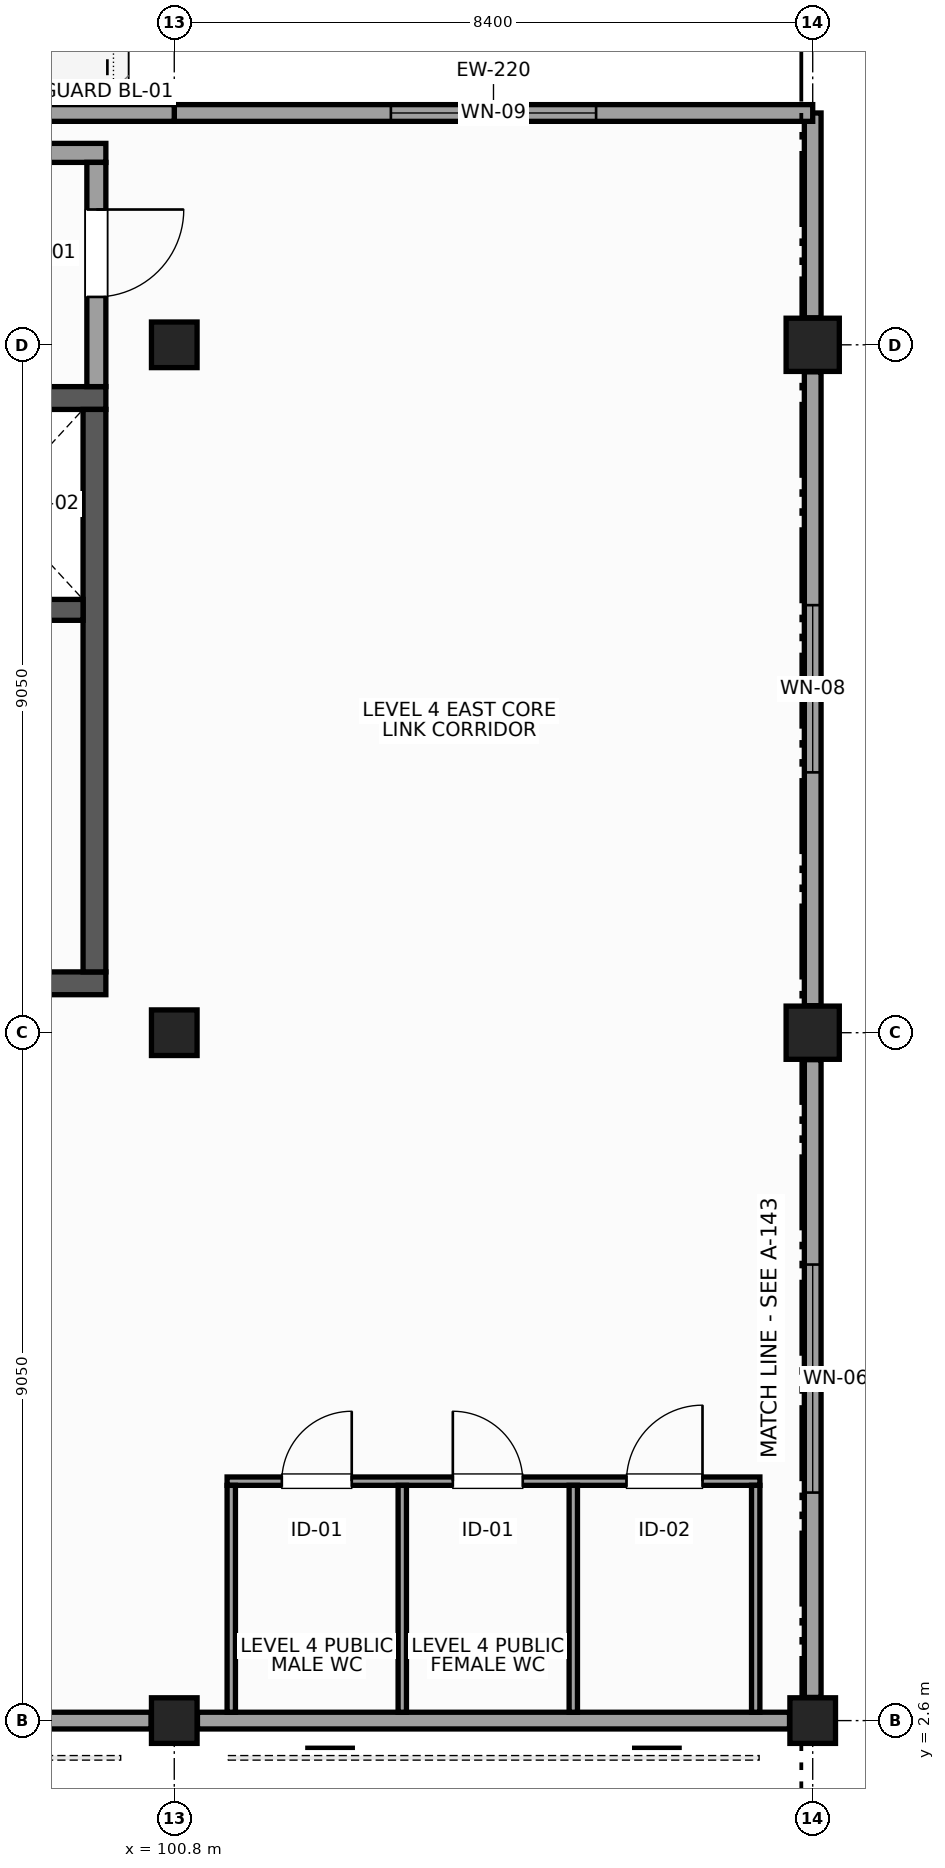
"""IFC4 building model, lengths in metres.
Left out: names, types, materials, properties, quantities, classifications, styles, units other than length and angle.
Written with IfcOpenShell. Run it as: python <this file> out.ifc"""

import sys

from ifc_helpers import new_model, si_unit, direction, frame, frame_2d, origin, origin_2d, place, context, subcontext, project, spatial, rectangle, extrude, element, fill, save


model = new_model("IFC4")
c1 = context("Model", 3, precision=1e-05, world=origin(), true_north=direction((0.0, 1.0)))
c2 = subcontext(c1, "Body", "Model", "MODEL_VIEW")
j1 = project(units=[si_unit("LENGTHUNIT", "METRE"), si_unit("PLANEANGLEUNIT", "RADIAN")], contexts=[c1])
p1 = place(None, origin())
s1 = spatial("IfcSite", under=j1, at=p1, CompositionType="ELEMENT")
p2 = place(p1, origin())
s2 = spatial("IfcBuilding", under=s1, at=p2, CompositionType="ELEMENT")
p3 = place(p2, frame((0.0, 0.0, 20.1)))
s3 = spatial("IfcBuildingStorey", under=s2, at=p3, CompositionType="ELEMENT", Elevation=20.1)
for number, where, z_axis, x_axis in (
    (1, (100.8, 2.6, 0.0), (0.0, 0.0, 1.0), (1.0, 0.0, 0.0)),
    (2, (100.8, 11.65, 0.0), (0.0, 0.0, 1.0), (1.0, 0.0, 0.0)),
    (3, (100.8, 20.7, 0.0), (0.0, 0.0, 1.0), (1.0, 0.0, 0.0)),
    (4, (109.2, 2.6, 0.0), (0.0, 0.0, 1.0), (1.0, 0.0, 0.0)),
):
    element("IfcColumn", number, at=place(p3, frame(where, z_axis=z_axis, x_axis=x_axis)), inside=s3, PredefinedType="COLUMN", context=c2, shape_type="SweptSolid", body=[
        extrude(rectangle(XDim=0.6, YDim=0.6, at=origin_2d()), origin(), (0.0, 0.0, 1.0), 4.5),
    ])
p4 = place(p3, frame((109.2, 11.65, 0.0), z_axis=(0.0, 0.0, 1.0), x_axis=(1.0, 0.0, 0.0)))
e5 = element("IfcColumn", 5, at=p4, inside=s3, PredefinedType="COLUMN", context=c2, shape_type="SweptSolid", body=[
    extrude(rectangle(XDim=0.7, YDim=0.7, at=origin_2d()), origin(), (0.0, 0.0, 1.0), 3.75),
])
p5 = place(p3, frame((109.2, 20.7, 0.0), z_axis=(0.0, 0.0, 1.0), x_axis=(1.0, 0.0, 0.0)))
e6 = element("IfcColumn", 6, at=p5, inside=s3, PredefinedType="COLUMN", context=c2, shape_type="SweptSolid", body=[
    extrude(rectangle(XDim=0.7, YDim=0.7, at=origin_2d()), origin(), (0.0, 0.0, 1.0), 4.2),
])
p6 = place(p3, frame((92.705, 2.6, 0.0), z_axis=(0.0, 0.0, 1.0), x_axis=(1.0, 0.0, 0.0)))
e7 = element("IfcWall", 7, at=p6, inside=s3, PredefinedType="STANDARD", context=c2, shape_type="SweptSolid", body=[
    extrude(rectangle(XDim=7.79, YDim=0.22, at=frame_2d((3.895, 0.0))), origin(), (0.0, 0.0, 1.0), 4.2),
])
p7 = place(p6, frame((2.595, 0.0, 0.95)))
e8 = element("IfcOpeningElement", 8, at=p7, cuts=e7, PredefinedType="OPENING", context=c2, shape_type="SweptSolid", body=[
    extrude(rectangle(XDim=2.6, YDim=1.6, at=frame_2d((1.3, 0.8))), frame((0.0, 0.12, 0.0), z_axis=(0.0, -1.0, 0.0), x_axis=(1.0, 0.0, 0.0)), (0.0, 0.0, 1.0), 0.24),
])
p8 = place(p3, frame((101.105, 2.6, 0.0), z_axis=(0.0, 0.0, 1.0), x_axis=(1.0, 0.0, 0.0)))
e9 = element("IfcWall", 9, at=p8, inside=s3, PredefinedType="STANDARD", context=c2, shape_type="SweptSolid", body=[
    extrude(rectangle(XDim=7.79, YDim=0.22, at=frame_2d((3.895, 0.0))), origin(), (0.0, 0.0, 1.0), 3.631),
])
p9 = place(p3, frame((109.2, 2.905, 0.0), z_axis=(0.0, 0.0, 1.0), x_axis=(0.0, 1.0, 0.0)))
e10 = element("IfcWall", 10, at=p9, inside=s3, PredefinedType="STANDARD", context=c2, shape_type="SweptSolid", body=[
    extrude(rectangle(XDim=8.39, YDim=0.22, at=frame_2d((4.195, 0.0))), origin(), (0.0, 0.0, 1.0), 3.631),
])
p10 = place(p9, frame((2.695, 0.0, 0.95)))
e11 = element("IfcOpeningElement", 11, at=p10, cuts=e10, PredefinedType="OPENING", context=c2, shape_type="SweptSolid", body=[
    extrude(rectangle(XDim=3.0, YDim=1.8, at=frame_2d((1.5, 0.9))), frame((0.0, 0.12, 0.0), z_axis=(0.0, -1.0, 0.0), x_axis=(1.0, 0.0, 0.0)), (0.0, 0.0, 1.0), 0.24),
])
p11 = place(p3, frame((109.2, 12.005, 0.0), z_axis=(0.0, 0.0, 1.0), x_axis=(0.0, 1.0, 0.0)))
e12 = element("IfcWall", 12, at=p11, inside=s3, PredefinedType="STANDARD", context=c2, shape_type="SweptSolid", body=[
    extrude(rectangle(XDim=8.34, YDim=0.22, at=frame_2d((4.17, 0.0))), origin(), (0.0, 0.0, 1.0), 3.504),
])
p12 = place(p11, frame((3.07, 0.0, 0.95)))
e13 = element("IfcOpeningElement", 13, at=p12, cuts=e12, PredefinedType="OPENING", context=c2, shape_type="SweptSolid", body=[
    extrude(rectangle(XDim=2.2, YDim=1.9, at=frame_2d((1.1, 0.95))), frame((0.0, 0.12, 0.0), z_axis=(0.0, -1.0, 0.0), x_axis=(1.0, 0.0, 0.0)), (0.0, 0.0, 1.0), 0.24),
])
p13 = place(p3, frame((109.2, 21.055, 0.0), z_axis=(0.0, 0.0, 1.0), x_axis=(0.0, 1.0, 0.0)))
e14 = element("IfcWall", 14, at=p13, inside=s3, PredefinedType="STANDARD", context=c2, shape_type="SweptSolid", body=[
    extrude(rectangle(XDim=2.695, YDim=0.22, at=frame_2d((1.348, 0.0))), origin(), (0.0, 0.0, 1.0), 3.504),
])
p14 = place(p3, frame((109.2, 23.75, 0.0), z_axis=(0.0, 0.0, 1.0), x_axis=(-1.0, 0.0, 0.0)))
e15 = element("IfcWall", 15, at=p14, inside=s3, PredefinedType="STANDARD", context=c2, shape_type="SweptSolid", body=[
    extrude(rectangle(XDim=8.4, YDim=0.22, at=frame_2d((4.2, 0.0))), origin(), (0.0, 0.0, 1.0), 3.428),
])
p15 = place(p14, frame((2.85, 0.0, 0.95)))
e16 = element("IfcOpeningElement", 16, at=p15, cuts=e15, PredefinedType="OPENING", context=c2, shape_type="SweptSolid", body=[
    extrude(rectangle(XDim=2.7, YDim=2.0, at=frame_2d((1.35, 1.0))), frame((0.0, 0.12, 0.0), z_axis=(0.0, -1.0, 0.0), x_axis=(1.0, 0.0, 0.0)), (0.0, 0.0, 1.0), 0.24),
])
p16 = place(p3, frame((100.8, 23.75, 0.0), z_axis=(0.0, 0.0, 1.0), x_axis=(-1.0, 0.0, 0.0)))
e17 = element("IfcWall", 17, at=p16, inside=s3, PredefinedType="STANDARD", context=c2, shape_type="SweptSolid", body=[
    extrude(rectangle(XDim=8.4, YDim=0.22, at=frame_2d((4.2, 0.0))), origin(), (0.0, 0.0, 1.0), 3.428),
])
p17 = place(p16, frame((3.2, 0.0, 0.95)))
e18 = element("IfcOpeningElement", 18, at=p17, cuts=e17, PredefinedType="OPENING", context=c2, shape_type="SweptSolid", body=[
    extrude(rectangle(XDim=2.0, YDim=1.5, at=frame_2d((1.0, 0.75))), frame((0.0, 0.12, 0.0), z_axis=(0.0, -1.0, 0.0), x_axis=(1.0, 0.0, 0.0)), (0.0, 0.0, 1.0), 0.24),
])
p18 = place(p3, frame((93.3, 12.3, 0.0), z_axis=(0.0, 0.0, 1.0), x_axis=(1.0, 0.0, 0.0)))
e19 = element("IfcWall", 19, at=p18, inside=s3, PredefinedType="SHEAR", context=c2, shape_type="SweptSolid", body=[
    extrude(rectangle(XDim=6.6, YDim=0.3, at=frame_2d((3.3, 0.0))), origin(), (0.0, 0.0, 1.0), 4.2),
])
p19 = place(p3, frame((93.3, 20.0, 0.0), z_axis=(0.0, 0.0, 1.0), x_axis=(1.0, 0.0, 0.0)))
e20 = element("IfcWall", 20, at=p19, inside=s3, PredefinedType="SHEAR", context=c2, shape_type="SweptSolid", body=[
    extrude(rectangle(XDim=6.6, YDim=0.3, at=frame_2d((3.3, 0.0))), origin(), (0.0, 0.0, 1.0), 4.2),
])
p20 = place(p19, frame((1.425, 0.0, 0.0)))
e21 = element("IfcOpeningElement", 21, at=p20, cuts=e20, PredefinedType="OPENING", context=c2, shape_type="SweptSolid", body=[
    extrude(rectangle(XDim=1.15, YDim=2.2, at=frame_2d((0.575, 1.1))), frame((0.0, 0.16, 0.0), z_axis=(0.0, -1.0, 0.0), x_axis=(1.0, 0.0, 0.0)), (0.0, 0.0, 1.0), 0.32),
])
p21 = place(p19, frame((4.55, 0.0, 0.0)))
e22 = element("IfcOpeningElement", 22, at=p21, cuts=e20, PredefinedType="OPENING", context=c2, shape_type="SweptSolid", body=[
    extrude(rectangle(XDim=1.2, YDim=2.15, at=frame_2d((0.6, 1.075))), frame((0.0, 0.16, 0.0), z_axis=(0.0, -1.0, 0.0), x_axis=(1.0, 0.0, 0.0)), (0.0, 0.0, 1.0), 0.32),
])
p22 = place(p3, frame((99.75, 12.45, 0.0), z_axis=(0.0, 0.0, 1.0), x_axis=(0.0, 1.0, 0.0)))
e23 = element("IfcWall", 23, at=p22, inside=s3, PredefinedType="SHEAR", context=c2, shape_type="SweptSolid", body=[
    extrude(rectangle(XDim=7.4, YDim=0.3, at=frame_2d((3.7, 0.0))), origin(), (0.0, 0.0, 1.0), 4.2),
])
p23 = place(p3, frame((97.3, 17.213, 0.0), z_axis=(0.0, 0.0, 1.0), x_axis=(1.0, 0.0, 0.0)))
e24 = element("IfcWall", 24, at=p23, inside=s3, PredefinedType="SHEAR", context=c2, shape_type="SweptSolid", body=[
    extrude(rectangle(XDim=2.3, YDim=0.275, at=frame_2d((1.15, 0.0))), origin(), (0.0, 0.0, 1.0), 4.2),
])
p24 = place(p3, frame((93.3, 23.225, 0.0), z_axis=(0.0, 0.0, 1.0), x_axis=(1.0, 0.0, 0.0)))
e25 = element("IfcWall", 25, at=p24, inside=s3, PredefinedType="PARTITIONING", context=c2, shape_type="SweptSolid", body=[
    extrude(rectangle(XDim=6.6, YDim=0.25, at=frame_2d((3.3, 0.0))), origin(), (0.0, 0.0, 1.0), 4.2),
])
p25 = place(p3, frame((99.775, 20.15, 0.0), z_axis=(0.0, 0.0, 1.0), x_axis=(0.0, 1.0, 0.0)))
e26 = element("IfcWall", 26, at=p25, inside=s3, PredefinedType="PARTITIONING", context=c2, shape_type="SweptSolid", body=[
    extrude(rectangle(XDim=2.95, YDim=0.25, at=frame_2d((1.475, 0.0))), origin(), (0.0, 0.0, 1.0), 3.783),
])
p26 = place(p25, frame((1.18, 0.0, 0.0)))
e27 = element("IfcOpeningElement", 27, at=p26, cuts=e26, PredefinedType="OPENING", context=c2, shape_type="SweptSolid", body=[
    extrude(rectangle(XDim=1.15, YDim=2.2, at=frame_2d((0.575, 1.1))), frame((0.0, 0.135, 0.0), z_axis=(0.0, -1.0, 0.0), x_axis=(1.0, 0.0, 0.0)), (0.0, 0.0, 1.0), 0.27),
])
p27 = place(p3, frame((101.495, 5.75, 0.0), z_axis=(0.0, 0.0, 1.0), x_axis=(1.0, 0.0, 0.0)))
e28 = element("IfcWall", 28, at=p27, inside=s3, PredefinedType="PARTITIONING", context=c2, shape_type="SweptSolid", body=[
    extrude(rectangle(XDim=7.01, YDim=0.11, at=frame_2d((3.505, 0.0))), origin(), (0.0, 0.0, 1.0), 3.631),
])
p28 = place(p27, frame((0.72, 0.0, 0.0)))
e29 = element("IfcOpeningElement", 29, at=p28, cuts=e28, PredefinedType="OPENING", context=c2, shape_type="SweptSolid", body=[
    extrude(rectangle(XDim=0.92, YDim=2.1, at=frame_2d((0.46, 1.05))), frame((0.0, 0.065, 0.0), z_axis=(0.0, -1.0, 0.0), x_axis=(1.0, 0.0, 0.0)), (0.0, 0.0, 1.0), 0.13),
])
p29 = place(p27, frame((2.97, 0.0, 0.0)))
e30 = element("IfcOpeningElement", 30, at=p29, cuts=e28, PredefinedType="OPENING", context=c2, shape_type="SweptSolid", body=[
    extrude(rectangle(XDim=0.92, YDim=2.1, at=frame_2d((0.46, 1.05))), frame((0.0, 0.065, 0.0), z_axis=(0.0, -1.0, 0.0), x_axis=(1.0, 0.0, 0.0)), (0.0, 0.0, 1.0), 0.13),
])
p30 = place(p27, frame((5.255, 0.0, 0.0)))
e31 = element("IfcOpeningElement", 31, at=p30, cuts=e28, PredefinedType="OPENING", context=c2, shape_type="SweptSolid", body=[
    extrude(rectangle(XDim=1.0, YDim=2.15, at=frame_2d((0.5, 1.075))), frame((0.0, 0.065, 0.0), z_axis=(0.0, -1.0, 0.0), x_axis=(1.0, 0.0, 0.0)), (0.0, 0.0, 1.0), 0.13),
])
for number, where, z_axis, x_axis in (
    (32, (101.55, 2.71, 0.0), (0.0, 0.0, 1.0), (0.0, 1.0, 0.0)),
    (33, (103.8, 2.71, 0.0), (0.0, 0.0, 1.0), (0.0, 1.0, 0.0)),
    (34, (106.05, 2.71, 0.0), (0.0, 0.0, 1.0), (0.0, 1.0, 0.0)),
    (35, (108.45, 2.71, 0.0), (0.0, 0.0, 1.0), (0.0, 1.0, 0.0)),
):
    element("IfcWall", number, at=place(p3, frame(where, z_axis=z_axis, x_axis=x_axis)), inside=s3, PredefinedType="PARTITIONING", context=c2, shape_type="SweptSolid", body=[
        extrude(rectangle(XDim=2.985, YDim=0.11, at=frame_2d((1.493, 0.0))), origin(), (0.0, 0.0, 1.0), 3.631),
    ])
p31 = place(p10, origin())
e36 = element("IfcWindow", 36, at=p31, inside=s3, PartitioningType="SINGLE_PANEL", PredefinedType="WINDOW", context=c2, shape_type="SweptSolid", body=[
    extrude(rectangle(XDim=3.0, YDim=1.8, at=frame_2d((1.5, 0.9))), frame((0.0, 0.03, 0.0), z_axis=(0.0, -1.0, 0.0), x_axis=(1.0, 0.0, 0.0)), (0.0, 0.0, 1.0), 0.06),
])
fill(e11, e36)
p32 = place(p12, origin())
e37 = element("IfcWindow", 37, at=p32, inside=s3, PartitioningType="SINGLE_PANEL", PredefinedType="WINDOW", context=c2, shape_type="SweptSolid", body=[
    extrude(rectangle(XDim=2.2, YDim=1.9, at=frame_2d((1.1, 0.95))), frame((0.0, 0.03, 0.0), z_axis=(0.0, -1.0, 0.0), x_axis=(1.0, 0.0, 0.0)), (0.0, 0.0, 1.0), 0.06),
])
fill(e13, e37)
p33 = place(p15, origin())
e38 = element("IfcWindow", 38, at=p33, inside=s3, PartitioningType="SINGLE_PANEL", PredefinedType="WINDOW", context=c2, shape_type="SweptSolid", body=[
    extrude(rectangle(XDim=2.7, YDim=2.0, at=frame_2d((1.35, 1.0))), frame((0.0, 0.03, 0.0), z_axis=(0.0, -1.0, 0.0), x_axis=(1.0, 0.0, 0.0)), (0.0, 0.0, 1.0), 0.06),
])
fill(e16, e38)
p34 = place(p26, frame((1.15, 0.0, 0.0), z_axis=(0.0, 0.0, 1.0), x_axis=(-1.0, 0.0, 0.0)))
e39 = element("IfcDoor", 39, at=p34, inside=s3, OperationType="SINGLE_SWING_LEFT", PredefinedType="DOOR", context=c2, shape_type="SweptSolid", body=[
    extrude(rectangle(XDim=1.15, YDim=2.2, at=frame_2d((0.575, 1.1))), frame((0.0, 0.025, 0.0), z_axis=(0.0, -1.0, 0.0), x_axis=(1.0, 0.0, 0.0)), (0.0, 0.0, 1.0), 0.05),
])
fill(e27, e39)
p35 = place(p28, origin())
e40 = element("IfcDoor", 40, at=p35, inside=s3, OperationType="SINGLE_SWING_RIGHT", PredefinedType="DOOR", context=c2, shape_type="SweptSolid", body=[
    extrude(rectangle(XDim=0.92, YDim=2.1, at=frame_2d((0.46, 1.05))), frame((0.0, 0.025, 0.0), z_axis=(0.0, -1.0, 0.0), x_axis=(1.0, 0.0, 0.0)), (0.0, 0.0, 1.0), 0.05),
])
fill(e29, e40)
p36 = place(p29, origin())
e41 = element("IfcDoor", 41, at=p36, inside=s3, OperationType="SINGLE_SWING_LEFT", PredefinedType="DOOR", context=c2, shape_type="SweptSolid", body=[
    extrude(rectangle(XDim=0.92, YDim=2.1, at=frame_2d((0.46, 1.05))), frame((0.0, 0.025, 0.0), z_axis=(0.0, -1.0, 0.0), x_axis=(1.0, 0.0, 0.0)), (0.0, 0.0, 1.0), 0.05),
])
fill(e30, e41)
p37 = place(p30, origin())
e42 = element("IfcDoor", 42, at=p37, inside=s3, OperationType="SINGLE_SWING_RIGHT", PredefinedType="DOOR", context=c2, shape_type="SweptSolid", body=[
    extrude(rectangle(XDim=1.0, YDim=2.15, at=frame_2d((0.5, 1.075))), frame((0.0, 0.025, 0.0), z_axis=(0.0, -1.0, 0.0), x_axis=(1.0, 0.0, 0.0)), (0.0, 0.0, 1.0), 0.05),
])
fill(e31, e42)
save(model, sys.argv[1])
